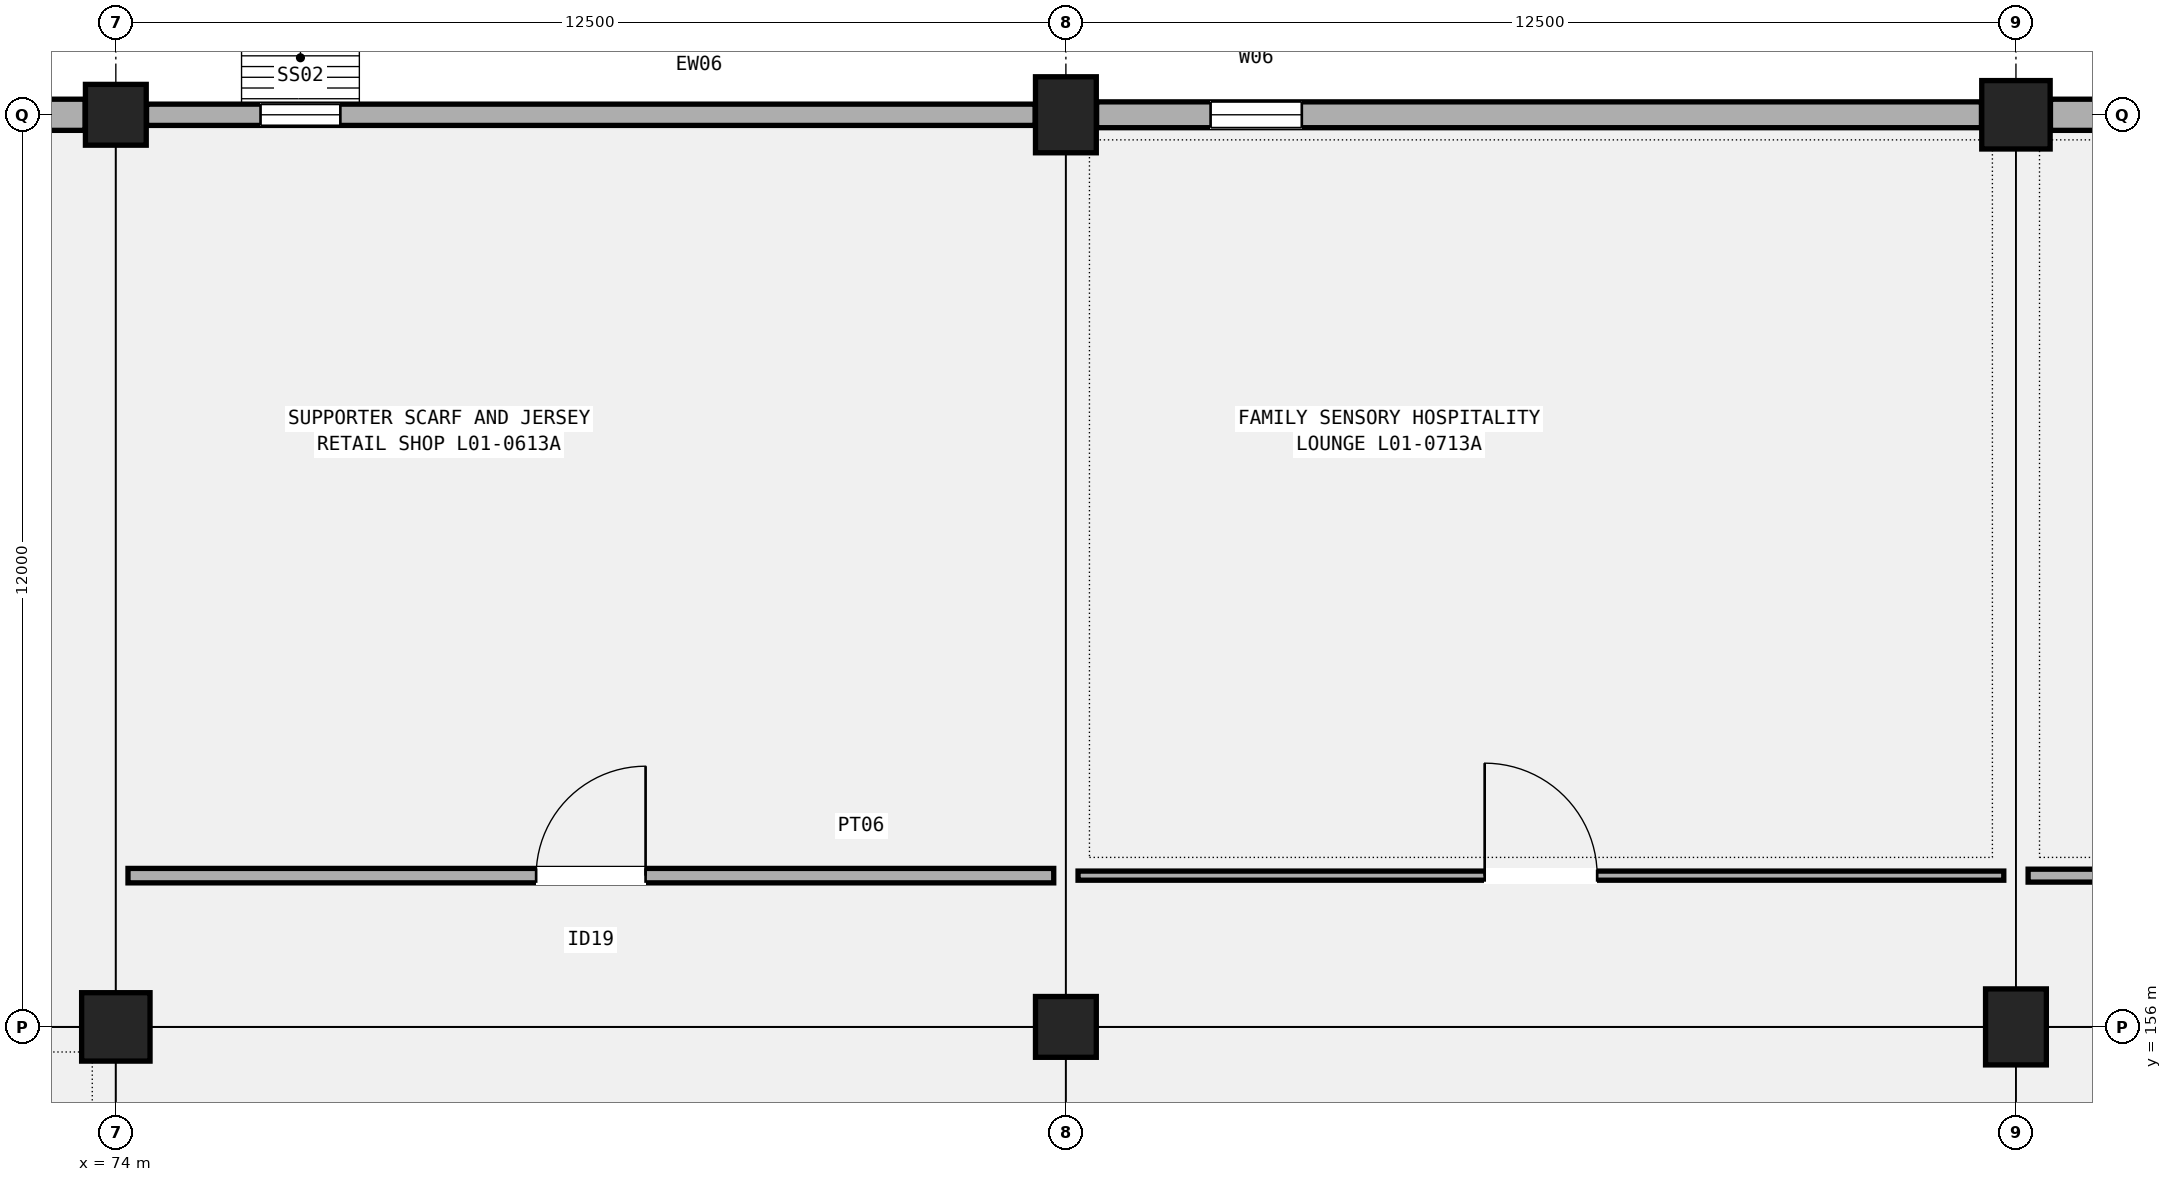
"""IFC4 building model, lengths in metres.
Left out: names, types, materials, properties, quantities, classifications, styles, units other than length and angle.
Written with IfcOpenShell. Run it as: python <this file> out.ifc"""

import sys

from ifc_helpers import new_model, si_unit, direction, frame, frame_2d, origin, origin_2d, place, context, subcontext, project, spatial, rectangle, extrude, element, fill, save


model = new_model("IFC4")
c1 = context("Model", 3, precision=1e-05, world=origin(), true_north=direction((0.0, 1.0)))
c2 = subcontext(c1, "Body", "Model", "MODEL_VIEW")
j1 = project(units=[si_unit("LENGTHUNIT", "METRE"), si_unit("PLANEANGLEUNIT", "RADIAN")], contexts=[c1])
p1 = place(None, origin())
s1 = spatial("IfcSite", under=j1, at=p1, CompositionType="ELEMENT")
p2 = place(p1, origin())
s2 = spatial("IfcBuilding", under=s1, at=p2, CompositionType="ELEMENT")
p3 = place(p2, frame((0.0, 0.0, 5.4)))
s3 = spatial("IfcBuildingStorey", under=s2, at=p3, CompositionType="ELEMENT", Elevation=5.4)
p4 = place(p3, frame((74.0, 156.0, 0.0), z_axis=(0.0, 0.0, 1.0), x_axis=(1.0, 0.0, 0.0)))
e1 = element("IfcColumn", 1, at=p4, inside=s3, PredefinedType="COLUMN", context=c2, shape_type="SweptSolid", body=[
    extrude(rectangle(XDim=0.9, YDim=0.9, at=origin_2d()), origin(), (0.0, 0.0, 1.0), 4.8),
])
for number, where, z_axis, x_axis in (
    (2, (74.0, 168.0, 0.0), (0.0, 0.0, 1.0), (1.0, 0.0, 0.0)),
    (3, (86.5, 156.0, 0.0), (0.0, 0.0, 1.0), (1.0, 0.0, 0.0)),
):
    element("IfcColumn", number, at=place(p3, frame(where, z_axis=z_axis, x_axis=x_axis)), inside=s3, PredefinedType="COLUMN", context=c2, shape_type="SweptSolid", body=[
        extrude(rectangle(XDim=0.8, YDim=0.8, at=origin_2d()), origin(), (0.0, 0.0, 1.0), 4.8),
    ])
for number, where, z_axis, x_axis in (
    (4, (86.5, 168.0, 0.0), (0.0, 0.0, 1.0), (1.0, 0.0, 0.0)),
    (5, (99.0, 156.0, 0.0), (0.0, 0.0, 1.0), (1.0, 0.0, 0.0)),
):
    element("IfcColumn", number, at=place(p3, frame(where, z_axis=z_axis, x_axis=x_axis)), inside=s3, PredefinedType="COLUMN", context=c2, shape_type="SweptSolid", body=[
        extrude(rectangle(XDim=0.8, YDim=1.0, at=origin_2d()), origin(), (0.0, 0.0, 1.0), 4.8),
    ])
p5 = place(p3, frame((99.0, 168.0, 0.0), z_axis=(0.0, 0.0, 1.0), x_axis=(1.0, 0.0, 0.0)))
e6 = element("IfcColumn", 6, at=p5, inside=s3, PredefinedType="COLUMN", context=c2, shape_type="SweptSolid", body=[
    extrude(rectangle(XDim=0.9, YDim=0.9, at=origin_2d()), origin(), (0.0, 0.0, 1.0), 4.8),
])
p6 = place(p3, frame((61.954, 168.0, 0.0), z_axis=(0.0, 0.0, 1.0), x_axis=(1.0, 0.0, 0.0)))
e7 = element("IfcWall", 7, at=p6, inside=s3, PredefinedType="SOLIDWALL", context=c2, shape_type="SweptSolid", body=[
    extrude(rectangle(XDim=11.642, YDim=0.41, at=frame_2d((5.821, 0.0))), origin(), (0.0, 0.0, 1.0), 4.2),
])
p7 = place(p6, frame((2.75, 0.0, 0.95)))
e8 = element("IfcOpeningElement", 8, at=p7, cuts=e7, PredefinedType="OPENING", context=c2, shape_type="SweptSolid", body=[
    extrude(rectangle(XDim=0.9, YDim=2.4, at=frame_2d((0.45, 1.2))), frame((0.0, 0.215, 0.0), z_axis=(0.0, -1.0, 0.0), x_axis=(1.0, 0.0, 0.0)), (0.0, 0.0, 1.0), 0.43),
])
p8 = place(p3, frame((74.404, 168.0, 0.0), z_axis=(0.0, 0.0, 1.0), x_axis=(1.0, 0.0, 0.0)))
e9 = element("IfcWall", 9, at=p8, inside=s3, PredefinedType="SOLIDWALL", context=c2, shape_type="SweptSolid", body=[
    extrude(rectangle(XDim=11.692, YDim=0.28, at=frame_2d((5.846, 0.0))), origin(), (0.0, 0.0, 1.0), 4.15),
])
p9 = place(p8, frame((1.5, 0.0, 0.95)))
e10 = element("IfcOpeningElement", 10, at=p9, cuts=e9, PredefinedType="OPENING", context=c2, shape_type="SweptSolid", body=[
    extrude(rectangle(XDim=1.05, YDim=2.2, at=frame_2d((0.525, 1.1))), frame((0.0, 0.15, 0.0), z_axis=(0.0, -1.0, 0.0), x_axis=(1.0, 0.0, 0.0)), (0.0, 0.0, 1.0), 0.3),
])
p10 = place(p3, frame((86.904, 168.0, 0.0), z_axis=(0.0, 0.0, 1.0), x_axis=(1.0, 0.0, 0.0)))
e11 = element("IfcWall", 11, at=p10, inside=s3, PredefinedType="SOLIDWALL", context=c2, shape_type="SweptSolid", body=[
    extrude(rectangle(XDim=11.642, YDim=0.34, at=frame_2d((5.821, 0.0))), origin(), (0.0, 0.0, 1.0), 4.2),
])
p11 = place(p10, frame((1.5, 0.0, 0.95)))
e12 = element("IfcOpeningElement", 12, at=p11, cuts=e11, PredefinedType="OPENING", context=c2, shape_type="SweptSolid", body=[
    extrude(rectangle(XDim=1.2, YDim=2.3, at=frame_2d((0.6, 1.15))), frame((0.0, 0.18, 0.0), z_axis=(0.0, -1.0, 0.0), x_axis=(1.0, 0.0, 0.0)), (0.0, 0.0, 1.0), 0.36),
])
p12 = place(p3, frame((99.454, 168.0, 0.0), z_axis=(0.0, 0.0, 1.0), x_axis=(1.0, 0.0, 0.0)))
e13 = element("IfcWall", 13, at=p12, inside=s3, PredefinedType="SOLIDWALL", context=c2, shape_type="SweptSolid", body=[
    extrude(rectangle(XDim=12.142, YDim=0.41, at=frame_2d((6.071, 0.0))), origin(), (0.0, 0.0, 1.0), 4.15),
])
p13 = place(p12, frame((1.5, 0.0, 0.95)))
e14 = element("IfcOpeningElement", 14, at=p13, cuts=e13, PredefinedType="OPENING", context=c2, shape_type="SweptSolid", body=[
    extrude(rectangle(XDim=1.35, YDim=2.4, at=frame_2d((0.675, 1.2))), frame((0.0, 0.215, 0.0), z_axis=(0.0, -1.0, 0.0), x_axis=(1.0, 0.0, 0.0)), (0.0, 0.0, 1.0), 0.43),
])
p14 = place(p3, frame((74.16, 157.99, 0.0), z_axis=(0.0, 0.0, 1.0), x_axis=(1.0, 0.0, 0.0)))
e15 = element("IfcWall", 15, at=p14, inside=s3, PredefinedType="PARTITIONING", context=c2, shape_type="SweptSolid", body=[
    extrude(rectangle(XDim=12.18, YDim=0.19, at=frame_2d((6.09, 0.0))), origin(), (0.0, 0.0, 1.0), 3.92),
])
p15 = place(p14, frame((5.37, 0.0, 0.0)))
e16 = element("IfcOpeningElement", 16, at=p15, cuts=e15, PredefinedType="OPENING", context=c2, shape_type="SweptSolid", body=[
    extrude(rectangle(XDim=1.44, YDim=2.26, at=frame_2d((0.72, 1.13))), frame((0.0, 0.105, 0.0), z_axis=(0.0, -1.0, 0.0), x_axis=(1.0, 0.0, 0.0)), (0.0, 0.0, 1.0), 0.21),
])
p16 = place(p3, frame((86.66, 157.99, 0.0), z_axis=(0.0, 0.0, 1.0), x_axis=(1.0, 0.0, 0.0)))
e17 = element("IfcWall", 17, at=p16, inside=s3, PredefinedType="PARTITIONING", context=c2, shape_type="SweptSolid", body=[
    extrude(rectangle(XDim=12.18, YDim=0.12, at=frame_2d((6.09, 0.0))), origin(), (0.0, 0.0, 1.0), 3.92),
])
p17 = place(p16, frame((5.35, 0.0, 0.0)))
e18 = element("IfcOpeningElement", 18, at=p17, cuts=e17, PredefinedType="OPENING", context=c2, shape_type="SweptSolid", body=[
    extrude(rectangle(XDim=1.48, YDim=2.24, at=frame_2d((0.74, 1.12))), frame((0.0, 0.07, 0.0), z_axis=(0.0, -1.0, 0.0), x_axis=(1.0, 0.0, 0.0)), (0.0, 0.0, 1.0), 0.14),
])
p18 = place(p3, frame((99.16, 157.99, 0.0), z_axis=(0.0, 0.0, 1.0), x_axis=(1.0, 0.0, 0.0)))
e19 = element("IfcWall", 19, at=p18, inside=s3, PredefinedType="PARTITIONING", context=c2, shape_type="SweptSolid", body=[
    extrude(rectangle(XDim=12.68, YDim=0.17, at=frame_2d((6.34, 0.0))), origin(), (0.0, 0.0, 1.0), 3.92),
])
p19 = place(p18, frame((5.49, 0.0, 0.0)))
e20 = element("IfcOpeningElement", 20, at=p19, cuts=e19, PredefinedType="OPENING", context=c2, shape_type="SweptSolid", body=[
    extrude(rectangle(XDim=1.7, YDim=2.32, at=frame_2d((0.85, 1.16))), frame((0.0, 0.095, 0.0), z_axis=(0.0, -1.0, 0.0), x_axis=(1.0, 0.0, 0.0)), (0.0, 0.0, 1.0), 0.19),
])
p20 = place(p9, origin())
e21 = element("IfcWindow", 21, at=p20, inside=s3, PartitioningType="SINGLE_PANEL", PredefinedType="WINDOW", context=c2, shape_type="SweptSolid", body=[
    extrude(rectangle(XDim=1.05, YDim=2.2, at=frame_2d((0.525, 1.1))), frame((0.0, 0.03, 0.0), z_axis=(0.0, -1.0, 0.0), x_axis=(1.0, 0.0, 0.0)), (0.0, 0.0, 1.0), 0.06),
])
fill(e10, e21)
p21 = place(p11, origin())
e22 = element("IfcWindow", 22, at=p21, inside=s3, PartitioningType="SINGLE_PANEL", PredefinedType="WINDOW", context=c2, shape_type="SweptSolid", body=[
    extrude(rectangle(XDim=1.2, YDim=2.3, at=frame_2d((0.6, 1.15))), frame((0.0, 0.03, 0.0), z_axis=(0.0, -1.0, 0.0), x_axis=(1.0, 0.0, 0.0)), (0.0, 0.0, 1.0), 0.06),
])
fill(e12, e22)
p22 = place(p15, origin())
e23 = element("IfcDoor", 23, at=p22, inside=s3, OperationType="SINGLE_SWING_RIGHT", PredefinedType="DOOR", context=c2, shape_type="SweptSolid", body=[
    extrude(rectangle(XDim=1.44, YDim=2.26, at=frame_2d((0.72, 1.13))), frame((0.0, 0.025, 0.0), z_axis=(0.0, -1.0, 0.0), x_axis=(1.0, 0.0, 0.0)), (0.0, 0.0, 1.0), 0.05),
])
fill(e16, e23)
p23 = place(p17, origin())
e24 = element("IfcDoor", 24, at=p23, inside=s3, OperationType="SINGLE_SWING_LEFT", PredefinedType="DOOR", context=c2, shape_type="SweptSolid", body=[
    extrude(rectangle(XDim=1.48, YDim=2.24, at=frame_2d((0.74, 1.12))), frame((0.0, 0.025, 0.0), z_axis=(0.0, -1.0, 0.0), x_axis=(1.0, 0.0, 0.0)), (0.0, 0.0, 1.0), 0.05),
])
fill(e18, e24)
save(model, sys.argv[1])
